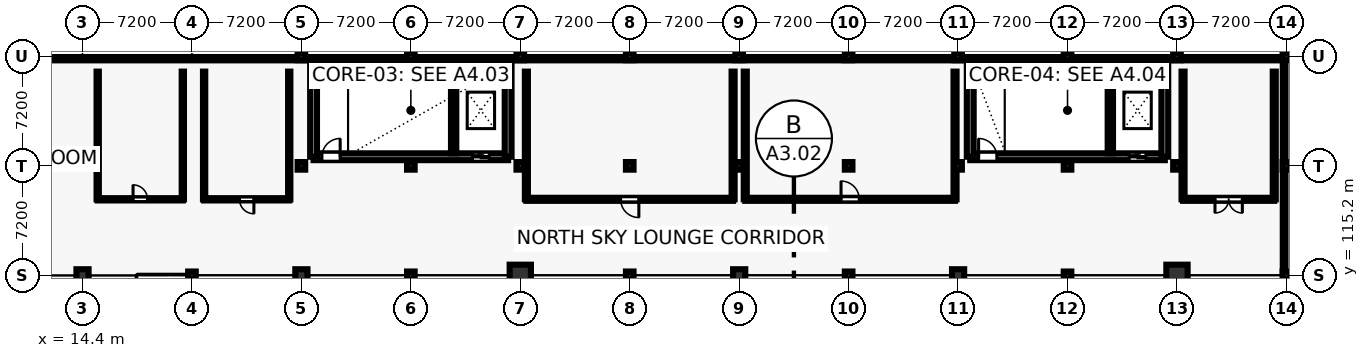
"""IFC4 building model, lengths in metres.
Left out: names, types, materials, properties, quantities, classifications, styles, units other than length and angle.
Written with IfcOpenShell. Run it as: python <this file> out.ifc"""

import sys

from ifc_helpers import new_model, si_unit, direction, frame, frame_2d, origin, origin_2d, place, context, subcontext, project, spatial, rectangle, circle, extrude, element, fill, save


model = new_model("IFC4")
c1 = context("Model", 3, precision=1e-05, world=origin(), true_north=direction((0.0, 1.0)))
c2 = subcontext(c1, "Body", "Model", "MODEL_VIEW")
j1 = project(units=[si_unit("LENGTHUNIT", "METRE"), si_unit("PLANEANGLEUNIT", "RADIAN")], contexts=[c1])
p1 = place(None, origin())
s1 = spatial("IfcSite", under=j1, at=p1, CompositionType="ELEMENT")
p2 = place(p1, origin())
s2 = spatial("IfcBuilding", under=s1, at=p2, CompositionType="ELEMENT")
p3 = place(p2, frame((0.0, 0.0, 23.0)))
s3 = spatial("IfcBuildingStorey", under=s2, at=p3, CompositionType="ELEMENT", Elevation=23.0)
p4 = place(p3, frame((14.4, 115.2, 0.0), z_axis=(0.0, 0.0, 1.0), x_axis=(1.0, 0.0, 0.0)))
e1 = element("IfcColumn", 1, at=p4, inside=s3, PredefinedType="COLUMN", context=c2, shape_type="SweptSolid", body=[
    extrude(circle(Radius=0.4, at=origin_2d()), origin(), (0.0, 0.0, 1.0), 5.92),
])
p5 = place(p3, frame((21.6, 115.2, 0.0), z_axis=(0.0, 0.0, 1.0), x_axis=(1.0, 0.0, 0.0)))
e2 = element("IfcColumn", 2, at=p5, inside=s3, PredefinedType="COLUMN", context=c2, shape_type="SweptSolid", body=[
    extrude(rectangle(XDim=0.5, YDim=0.5, at=origin_2d()), origin(), (0.0, 0.0, 1.0), 4.5),
])
p6 = place(p3, frame((28.8, 115.2, 0.0), z_axis=(0.0, 0.0, 1.0), x_axis=(1.0, 0.0, 0.0)))
e3 = element("IfcColumn", 3, at=p6, inside=s3, PredefinedType="COLUMN", context=c2, shape_type="SweptSolid", body=[
    extrude(circle(Radius=0.4, at=origin_2d()), origin(), (0.0, 0.0, 1.0), 4.75),
])
for number, where, z_axis, x_axis in (
    (4, (28.8, 122.4, 0.0), (0.0, 0.0, 1.0), (1.0, 0.0, 0.0)),
    (5, (28.8, 129.6, 0.0), (0.0, 0.0, 1.0), (1.0, 0.0, 0.0)),
    (6, (36.0, 115.2, 0.0), (0.0, 0.0, 1.0), (1.0, 0.0, 0.0)),
    (7, (36.0, 122.4, 0.0), (0.0, 0.0, 1.0), (1.0, 0.0, 0.0)),
    (8, (36.0, 129.6, 0.0), (0.0, 0.0, 1.0), (1.0, 0.0, 0.0)),
):
    element("IfcColumn", number, at=place(p3, frame(where, z_axis=z_axis, x_axis=x_axis)), inside=s3, PredefinedType="COLUMN", context=c2, shape_type="SweptSolid", body=[
        extrude(rectangle(XDim=0.5, YDim=0.5, at=origin_2d()), origin(), (0.0, 0.0, 1.0), 4.5),
    ])
p7 = place(p3, frame((43.2, 115.2, 0.0), z_axis=(0.0, 0.0, 1.0), x_axis=(1.0, 0.0, 0.0)))
e9 = element("IfcColumn", 9, at=p7, inside=s3, PredefinedType="COLUMN", context=c2, shape_type="SweptSolid", body=[
    extrude(circle(Radius=0.7, at=origin_2d()), origin(), (0.0, 0.0, 1.0), 4.75),
])
for number, where, z_axis, x_axis in (
    (10, (43.2, 122.4, 0.0), (0.0, 0.0, 1.0), (1.0, 0.0, 0.0)),
    (11, (43.2, 129.6, 0.0), (0.0, 0.0, 1.0), (1.0, 0.0, 0.0)),
    (12, (50.4, 115.2, 0.0), (0.0, 0.0, 1.0), (1.0, 0.0, 0.0)),
    (13, (50.4, 122.4, 0.0), (0.0, 0.0, 1.0), (1.0, 0.0, 0.0)),
    (14, (50.4, 129.6, 0.0), (0.0, 0.0, 1.0), (1.0, 0.0, 0.0)),
):
    element("IfcColumn", number, at=place(p3, frame(where, z_axis=z_axis, x_axis=x_axis)), inside=s3, PredefinedType="COLUMN", context=c2, shape_type="SweptSolid", body=[
        extrude(rectangle(XDim=0.5, YDim=0.5, at=origin_2d()), origin(), (0.0, 0.0, 1.0), 4.5),
    ])
p8 = place(p3, frame((57.6, 115.2, 0.0), z_axis=(0.0, 0.0, 1.0), x_axis=(1.0, 0.0, 0.0)))
e15 = element("IfcColumn", 15, at=p8, inside=s3, PredefinedType="COLUMN", context=c2, shape_type="SweptSolid", body=[
    extrude(circle(Radius=0.4, at=origin_2d()), origin(), (0.0, 0.0, 1.0), 4.75),
])
for number, where, z_axis, x_axis in (
    (16, (57.6, 122.4, 0.0), (0.0, 0.0, 1.0), (1.0, 0.0, 0.0)),
    (17, (57.6, 129.6, 0.0), (0.0, 0.0, 1.0), (1.0, 0.0, 0.0)),
    (18, (64.8, 115.2, 0.0), (0.0, 0.0, 1.0), (1.0, 0.0, 0.0)),
    (19, (64.8, 122.4, 0.0), (0.0, 0.0, 1.0), (1.0, 0.0, 0.0)),
    (20, (64.8, 129.6, 0.0), (0.0, 0.0, 1.0), (1.0, 0.0, 0.0)),
):
    element("IfcColumn", number, at=place(p3, frame(where, z_axis=z_axis, x_axis=x_axis)), inside=s3, PredefinedType="COLUMN", context=c2, shape_type="SweptSolid", body=[
        extrude(rectangle(XDim=0.5, YDim=0.5, at=origin_2d()), origin(), (0.0, 0.0, 1.0), 4.5),
    ])
p9 = place(p3, frame((72.0, 115.2, 0.0), z_axis=(0.0, 0.0, 1.0), x_axis=(1.0, 0.0, 0.0)))
e21 = element("IfcColumn", 21, at=p9, inside=s3, PredefinedType="COLUMN", context=c2, shape_type="SweptSolid", body=[
    extrude(circle(Radius=0.4, at=origin_2d()), origin(), (0.0, 0.0, 1.0), 4.75),
])
for number, where, z_axis, x_axis in (
    (22, (72.0, 122.4, 0.0), (0.0, 0.0, 1.0), (1.0, 0.0, 0.0)),
    (23, (72.0, 129.6, 0.0), (0.0, 0.0, 1.0), (1.0, 0.0, 0.0)),
    (24, (79.2, 115.2, 0.0), (0.0, 0.0, 1.0), (1.0, 0.0, 0.0)),
    (25, (79.2, 122.4, 0.0), (0.0, 0.0, 1.0), (1.0, 0.0, 0.0)),
    (26, (79.2, 129.6, 0.0), (0.0, 0.0, 1.0), (1.0, 0.0, 0.0)),
):
    element("IfcColumn", number, at=place(p3, frame(where, z_axis=z_axis, x_axis=x_axis)), inside=s3, PredefinedType="COLUMN", context=c2, shape_type="SweptSolid", body=[
        extrude(rectangle(XDim=0.5, YDim=0.5, at=origin_2d()), origin(), (0.0, 0.0, 1.0), 4.5),
    ])
p10 = place(p3, frame((86.4, 115.2, 0.0), z_axis=(0.0, 0.0, 1.0), x_axis=(1.0, 0.0, 0.0)))
e27 = element("IfcColumn", 27, at=p10, inside=s3, PredefinedType="COLUMN", context=c2, shape_type="SweptSolid", body=[
    extrude(circle(Radius=0.7, at=origin_2d()), origin(), (0.0, 0.0, 1.0), 4.75),
])
for number, where, z_axis, x_axis in (
    (28, (86.4, 122.4, 0.0), (0.0, 0.0, 1.0), (1.0, 0.0, 0.0)),
    (29, (86.4, 129.6, 0.0), (0.0, 0.0, 1.0), (1.0, 0.0, 0.0)),
    (30, (93.6, 115.2, 0.0), (0.0, 0.0, 1.0), (1.0, 0.0, 0.0)),
    (31, (93.6, 122.4, 0.0), (0.0, 0.0, 1.0), (1.0, 0.0, 0.0)),
    (32, (93.6, 129.6, 0.0), (0.0, 0.0, 1.0), (1.0, 0.0, 0.0)),
):
    element("IfcColumn", number, at=place(p3, frame(where, z_axis=z_axis, x_axis=x_axis)), inside=s3, PredefinedType="COLUMN", context=c2, shape_type="SweptSolid", body=[
        extrude(rectangle(XDim=0.5, YDim=0.5, at=origin_2d()), origin(), (0.0, 0.0, 1.0), 4.5),
    ])
p11 = place(p3, frame((29.6, 123.0, 0.0), z_axis=(0.0, 0.0, 1.0), x_axis=(1.0, 0.0, 0.0)))
e33 = element("IfcWall", 33, at=p11, inside=s3, PredefinedType="SHEAR", context=c2, shape_type="SweptSolid", body=[
    extrude(rectangle(XDim=12.8, YDim=0.45, at=frame_2d((6.4, 0.0))), origin(), (0.0, 0.0, 1.0), 4.28),
])
p12 = place(p11, frame((0.55, 0.0, 0.0)))
e34 = element("IfcOpeningElement", 34, at=p12, cuts=e33, PredefinedType="OPENING", context=c2, shape_type="SweptSolid", body=[
    extrude(rectangle(XDim=1.2, YDim=2.25, at=frame_2d((0.6, 1.125))), frame((0.0, 0.235, 0.0), z_axis=(0.0, -1.0, 0.0), x_axis=(1.0, 0.0, 0.0)), (0.0, 0.0, 1.0), 0.47),
])
p13 = place(p11, frame((10.458, 0.0, 0.0)))
e35 = element("IfcOpeningElement", 35, at=p13, cuts=e33, PredefinedType="OPENING", context=c2, shape_type="SweptSolid", body=[
    extrude(rectangle(XDim=1.1, YDim=2.2, at=frame_2d((0.55, 1.1))), frame((0.0, 0.235, 0.0), z_axis=(0.0, -1.0, 0.0), x_axis=(1.0, 0.0, 0.0)), (0.0, 0.0, 1.0), 0.47),
])
p14 = place(p3, frame((29.6, 129.1, 0.0), z_axis=(0.0, 0.0, 1.0), x_axis=(1.0, 0.0, 0.0)))
e36 = element("IfcWall", 36, at=p14, inside=s3, PredefinedType="SHEAR", context=c2, shape_type="SweptSolid", body=[
    extrude(rectangle(XDim=12.8, YDim=0.45, at=frame_2d((6.4, 0.0))), origin(), (0.0, 0.0, 1.0), 4.28),
])
for number, where, z_axis, x_axis in (
    (37, (29.6, 123.0, 0.0), (0.0, 0.0, 1.0), (0.0, 1.0, 0.0)),
    (38, (42.4, 123.0, 0.0), (0.0, 0.0, 1.0), (0.0, 1.0, 0.0)),
):
    element("IfcWall", number, at=place(p3, frame(where, z_axis=z_axis, x_axis=x_axis)), inside=s3, PredefinedType="SHEAR", context=c2, shape_type="SweptSolid", body=[
        extrude(rectangle(XDim=6.1, YDim=0.45, at=frame_2d((3.05, 0.0))), origin(), (0.0, 0.0, 1.0), 4.28),
    ])
p15 = place(p3, frame((38.816, 123.225, 0.0), z_axis=(0.0, 0.0, 1.0), x_axis=(0.0, 1.0, 0.0)))
e39 = element("IfcWall", 39, at=p15, inside=s3, PredefinedType="SHEAR", context=c2, shape_type="SweptSolid", body=[
    extrude(rectangle(XDim=5.65, YDim=0.35, at=frame_2d((2.825, 0.0))), origin(), (0.0, 0.0, 1.0), 4.28),
])
p16 = place(p3, frame((72.8, 123.0, 0.0), z_axis=(0.0, 0.0, 1.0), x_axis=(1.0, 0.0, 0.0)))
e40 = element("IfcWall", 40, at=p16, inside=s3, PredefinedType="SHEAR", context=c2, shape_type="SweptSolid", body=[
    extrude(rectangle(XDim=12.8, YDim=0.45, at=frame_2d((6.4, 0.0))), origin(), (0.0, 0.0, 1.0), 4.28),
])
p17 = place(p16, frame((0.55, 0.0, 0.0)))
e41 = element("IfcOpeningElement", 41, at=p17, cuts=e40, PredefinedType="OPENING", context=c2, shape_type="SweptSolid", body=[
    extrude(rectangle(XDim=1.2, YDim=2.25, at=frame_2d((0.6, 1.125))), frame((0.0, 0.235, 0.0), z_axis=(0.0, -1.0, 0.0), x_axis=(1.0, 0.0, 0.0)), (0.0, 0.0, 1.0), 0.47),
])
p18 = place(p16, frame((10.458, 0.0, 0.0)))
e42 = element("IfcOpeningElement", 42, at=p18, cuts=e40, PredefinedType="OPENING", context=c2, shape_type="SweptSolid", body=[
    extrude(rectangle(XDim=1.1, YDim=2.2, at=frame_2d((0.55, 1.1))), frame((0.0, 0.235, 0.0), z_axis=(0.0, -1.0, 0.0), x_axis=(1.0, 0.0, 0.0)), (0.0, 0.0, 1.0), 0.47),
])
p19 = place(p3, frame((72.8, 129.1, 0.0), z_axis=(0.0, 0.0, 1.0), x_axis=(1.0, 0.0, 0.0)))
e43 = element("IfcWall", 43, at=p19, inside=s3, PredefinedType="SHEAR", context=c2, shape_type="SweptSolid", body=[
    extrude(rectangle(XDim=12.8, YDim=0.45, at=frame_2d((6.4, 0.0))), origin(), (0.0, 0.0, 1.0), 4.28),
])
for number, where, z_axis, x_axis in (
    (44, (72.8, 123.0, 0.0), (0.0, 0.0, 1.0), (0.0, 1.0, 0.0)),
    (45, (85.6, 123.0, 0.0), (0.0, 0.0, 1.0), (0.0, 1.0, 0.0)),
):
    element("IfcWall", number, at=place(p3, frame(where, z_axis=z_axis, x_axis=x_axis)), inside=s3, PredefinedType="SHEAR", context=c2, shape_type="SweptSolid", body=[
        extrude(rectangle(XDim=6.1, YDim=0.45, at=frame_2d((3.05, 0.0))), origin(), (0.0, 0.0, 1.0), 4.28),
    ])
p20 = place(p3, frame((82.016, 123.225, 0.0), z_axis=(0.0, 0.0, 1.0), x_axis=(0.0, 1.0, 0.0)))
e46 = element("IfcWall", 46, at=p20, inside=s3, PredefinedType="SHEAR", context=c2, shape_type="SweptSolid", body=[
    extrude(rectangle(XDim=5.65, YDim=0.35, at=frame_2d((2.825, 0.0))), origin(), (0.0, 0.0, 1.0), 4.28),
])
p21 = place(p3, frame((0.15, 129.45, 4.5), z_axis=(0.0, 0.0, 1.0), x_axis=(1.0, 0.0, 0.0)))
e47 = element("IfcWall", 47, at=p21, inside=s3, PredefinedType="PARAPET", context=c2, shape_type="SweptSolid", body=[
    extrude(rectangle(XDim=93.3, YDim=0.22, at=frame_2d((46.65, 0.0))), origin(), (0.0, 0.0, 1.0), 1.15),
])
p22 = place(p3, frame((93.45, 115.35, 4.5), z_axis=(0.0, 0.0, 1.0), x_axis=(0.0, 1.0, 0.0)))
e48 = element("IfcWall", 48, at=p22, inside=s3, PredefinedType="PARAPET", context=c2, shape_type="SweptSolid", body=[
    extrude(rectangle(XDim=14.1, YDim=0.18, at=frame_2d((7.05, 0.0))), origin(), (0.0, 0.0, 1.0), 1.15),
])
p23 = place(p3, frame((43.6, 120.2, 0.0), z_axis=(0.0, 0.0, 1.0), x_axis=(1.0, 0.0, 0.0)))
e49 = element("IfcWall", 49, at=p23, inside=s3, PredefinedType="PARTITIONING", context=c2, shape_type="SweptSolid", body=[
    extrude(rectangle(XDim=13.6, YDim=0.2, at=frame_2d((6.8, 0.0))), origin(), (0.0, 0.0, 1.0), 3.34),
])
p24 = place(p23, frame((6.2, 0.0, 0.0)))
e50 = element("IfcOpeningElement", 50, at=p24, cuts=e49, PredefinedType="OPENING", context=c2, shape_type="SweptSolid", body=[
    extrude(rectangle(XDim=1.2, YDim=2.25, at=frame_2d((0.6, 1.125))), frame((0.0, 0.11, 0.0), z_axis=(0.0, -1.0, 0.0), x_axis=(1.0, 0.0, 0.0)), (0.0, 0.0, 1.0), 0.22),
])
for number, where, z_axis, x_axis in (
    (51, (57.2, 120.2, 0.0), (0.0, 0.0, 1.0), (0.0, 1.0, 0.0)),
    (52, (43.6, 128.6, 0.0), (0.0, 0.0, 1.0), (0.0, -1.0, 0.0)),
):
    element("IfcWall", number, at=place(p3, frame(where, z_axis=z_axis, x_axis=x_axis)), inside=s3, PredefinedType="PARTITIONING", context=c2, shape_type="SweptSolid", body=[
        extrude(rectangle(XDim=8.4, YDim=0.2, at=frame_2d((4.2, 0.0))), origin(), (0.0, 0.0, 1.0), 3.34),
    ])
p25 = place(p3, frame((58.0, 120.2, 0.0), z_axis=(0.0, 0.0, 1.0), x_axis=(1.0, 0.0, 0.0)))
e53 = element("IfcWall", 53, at=p25, inside=s3, PredefinedType="PARTITIONING", context=c2, shape_type="SweptSolid", body=[
    extrude(rectangle(XDim=13.8, YDim=0.2, at=frame_2d((6.9, 0.0))), origin(), (0.0, 0.0, 1.0), 3.34),
])
p26 = place(p25, frame((6.3, 0.0, 0.0)))
e54 = element("IfcOpeningElement", 54, at=p26, cuts=e53, PredefinedType="OPENING", context=c2, shape_type="SweptSolid", body=[
    extrude(rectangle(XDim=1.2, YDim=2.25, at=frame_2d((0.6, 1.125))), frame((0.0, 0.11, 0.0), z_axis=(0.0, -1.0, 0.0), x_axis=(1.0, 0.0, 0.0)), (0.0, 0.0, 1.0), 0.22),
])
for number, where, z_axis, x_axis in (
    (55, (71.8, 120.2, 0.0), (0.0, 0.0, 1.0), (0.0, 1.0, 0.0)),
    (56, (58.0, 128.6, 0.0), (0.0, 0.0, 1.0), (0.0, -1.0, 0.0)),
):
    element("IfcWall", number, at=place(p3, frame(where, z_axis=z_axis, x_axis=x_axis)), inside=s3, PredefinedType="PARTITIONING", context=c2, shape_type="SweptSolid", body=[
        extrude(rectangle(XDim=8.4, YDim=0.2, at=frame_2d((4.2, 0.0))), origin(), (0.0, 0.0, 1.0), 3.34),
    ])
p27 = place(p3, frame((86.8, 120.2, 0.0), z_axis=(0.0, 0.0, 1.0), x_axis=(1.0, 0.0, 0.0)))
e57 = element("IfcWall", 57, at=p27, inside=s3, PredefinedType="PARTITIONING", context=c2, shape_type="SweptSolid", body=[
    extrude(rectangle(XDim=6.0, YDim=0.2, at=frame_2d((3.0, 0.0))), origin(), (0.0, 0.0, 1.0), 3.34),
])
p28 = place(p27, frame((2.1, 0.0, 0.0)))
e58 = element("IfcOpeningElement", 58, at=p28, cuts=e57, PredefinedType="OPENING", context=c2, shape_type="SweptSolid", body=[
    extrude(rectangle(XDim=1.8, YDim=2.3, at=frame_2d((0.9, 1.15))), frame((0.0, 0.11, 0.0), z_axis=(0.0, -1.0, 0.0), x_axis=(1.0, 0.0, 0.0)), (0.0, 0.0, 1.0), 0.22),
])
for number, where, z_axis, x_axis in (
    (59, (92.8, 120.2, 0.0), (0.0, 0.0, 1.0), (0.0, 1.0, 0.0)),
    (60, (86.8, 128.6, 0.0), (0.0, 0.0, 1.0), (0.0, -1.0, 0.0)),
):
    element("IfcWall", number, at=place(p3, frame(where, z_axis=z_axis, x_axis=x_axis)), inside=s3, PredefinedType="PARTITIONING", context=c2, shape_type="SweptSolid", body=[
        extrude(rectangle(XDim=8.4, YDim=0.2, at=frame_2d((4.2, 0.0))), origin(), (0.0, 0.0, 1.0), 3.34),
    ])
p29 = place(p3, frame((15.4, 120.2, 0.0), z_axis=(0.0, 0.0, 1.0), x_axis=(1.0, 0.0, 0.0)))
e61 = element("IfcWall", 61, at=p29, inside=s3, PredefinedType="PARTITIONING", context=c2, shape_type="SweptSolid", body=[
    extrude(rectangle(XDim=5.6, YDim=0.15, at=frame_2d((2.8, 0.0))), origin(), (0.0, 0.0, 1.0), 3.34),
])
p30 = place(p29, frame((2.325, 0.0, 0.0)))
e62 = element("IfcOpeningElement", 62, at=p30, cuts=e61, PredefinedType="OPENING", context=c2, shape_type="SweptSolid", body=[
    extrude(rectangle(XDim=0.95, YDim=2.15, at=frame_2d((0.475, 1.075))), frame((0.0, 0.085, 0.0), z_axis=(0.0, -1.0, 0.0), x_axis=(1.0, 0.0, 0.0)), (0.0, 0.0, 1.0), 0.17),
])
for number, where, z_axis, x_axis in (
    (63, (21.0, 120.2, 0.0), (0.0, 0.0, 1.0), (0.0, 1.0, 0.0)),
    (64, (15.4, 128.6, 0.0), (0.0, 0.0, 1.0), (0.0, -1.0, 0.0)),
):
    element("IfcWall", number, at=place(p3, frame(where, z_axis=z_axis, x_axis=x_axis)), inside=s3, PredefinedType="PARTITIONING", context=c2, shape_type="SweptSolid", body=[
        extrude(rectangle(XDim=8.4, YDim=0.15, at=frame_2d((4.2, 0.0))), origin(), (0.0, 0.0, 1.0), 3.34),
    ])
p31 = place(p3, frame((22.4, 120.2, 0.0), z_axis=(0.0, 0.0, 1.0), x_axis=(1.0, 0.0, 0.0)))
e65 = element("IfcWall", 65, at=p31, inside=s3, PredefinedType="PARTITIONING", context=c2, shape_type="SweptSolid", body=[
    extrude(rectangle(XDim=5.6, YDim=0.15, at=frame_2d((2.8, 0.0))), origin(), (0.0, 0.0, 1.0), 3.34),
])
p32 = place(p31, frame((2.325, 0.0, 0.0)))
e66 = element("IfcOpeningElement", 66, at=p32, cuts=e65, PredefinedType="OPENING", context=c2, shape_type="SweptSolid", body=[
    extrude(rectangle(XDim=0.95, YDim=2.15, at=frame_2d((0.475, 1.075))), frame((0.0, 0.085, 0.0), z_axis=(0.0, -1.0, 0.0), x_axis=(1.0, 0.0, 0.0)), (0.0, 0.0, 1.0), 0.17),
])
for number, where, z_axis, x_axis in (
    (67, (28.0, 120.2, 0.0), (0.0, 0.0, 1.0), (0.0, 1.0, 0.0)),
    (68, (22.4, 128.6, 0.0), (0.0, 0.0, 1.0), (0.0, -1.0, 0.0)),
):
    element("IfcWall", number, at=place(p3, frame(where, z_axis=z_axis, x_axis=x_axis)), inside=s3, PredefinedType="PARTITIONING", context=c2, shape_type="SweptSolid", body=[
        extrude(rectangle(XDim=8.4, YDim=0.15, at=frame_2d((4.2, 0.0))), origin(), (0.0, 0.0, 1.0), 3.34),
    ])
p33 = place(p12, origin())
e69 = element("IfcDoor", 69, at=p33, inside=s3, OperationType="SINGLE_SWING_RIGHT", PredefinedType="DOOR", context=c2, shape_type="SweptSolid", body=[
    extrude(rectangle(XDim=1.2, YDim=2.25, at=frame_2d((0.6, 1.125))), frame((0.0, 0.025, 0.0), z_axis=(0.0, -1.0, 0.0), x_axis=(1.0, 0.0, 0.0)), (0.0, 0.0, 1.0), 0.05),
])
fill(e34, e69)
p34 = place(p13, origin())
e70 = element("IfcDoor", 70, at=p34, inside=s3, OperationType="SLIDING_TO_LEFT", PredefinedType="DOOR", context=c2, shape_type="SweptSolid", body=[
    extrude(rectangle(XDim=1.1, YDim=2.2, at=frame_2d((0.55, 1.1))), frame((0.0, 0.025, 0.0), z_axis=(0.0, -1.0, 0.0), x_axis=(1.0, 0.0, 0.0)), (0.0, 0.0, 1.0), 0.05),
])
fill(e35, e70)
p35 = place(p17, origin())
e71 = element("IfcDoor", 71, at=p35, inside=s3, OperationType="SINGLE_SWING_LEFT", PredefinedType="DOOR", context=c2, shape_type="SweptSolid", body=[
    extrude(rectangle(XDim=1.2, YDim=2.25, at=frame_2d((0.6, 1.125))), frame((0.0, 0.025, 0.0), z_axis=(0.0, -1.0, 0.0), x_axis=(1.0, 0.0, 0.0)), (0.0, 0.0, 1.0), 0.05),
])
fill(e41, e71)
p36 = place(p18, origin())
e72 = element("IfcDoor", 72, at=p36, inside=s3, OperationType="SLIDING_TO_LEFT", PredefinedType="DOOR", context=c2, shape_type="SweptSolid", body=[
    extrude(rectangle(XDim=1.1, YDim=2.2, at=frame_2d((0.55, 1.1))), frame((0.0, 0.025, 0.0), z_axis=(0.0, -1.0, 0.0), x_axis=(1.0, 0.0, 0.0)), (0.0, 0.0, 1.0), 0.05),
])
fill(e42, e72)
p37 = place(p24, frame((1.2, 0.0, 0.0), z_axis=(0.0, 0.0, 1.0), x_axis=(-1.0, 0.0, 0.0)))
e73 = element("IfcDoor", 73, at=p37, inside=s3, OperationType="SINGLE_SWING_RIGHT", PredefinedType="DOOR", context=c2, shape_type="SweptSolid", body=[
    extrude(rectangle(XDim=1.2, YDim=2.25, at=frame_2d((0.6, 1.125))), frame((0.0, 0.025, 0.0), z_axis=(0.0, -1.0, 0.0), x_axis=(1.0, 0.0, 0.0)), (0.0, 0.0, 1.0), 0.05),
])
fill(e50, e73)
p38 = place(p26, origin())
e74 = element("IfcDoor", 74, at=p38, inside=s3, OperationType="SINGLE_SWING_LEFT", PredefinedType="DOOR", context=c2, shape_type="SweptSolid", body=[
    extrude(rectangle(XDim=1.2, YDim=2.25, at=frame_2d((0.6, 1.125))), frame((0.0, 0.025, 0.0), z_axis=(0.0, -1.0, 0.0), x_axis=(1.0, 0.0, 0.0)), (0.0, 0.0, 1.0), 0.05),
])
fill(e54, e74)
p39 = place(p28, frame((1.8, 0.0, 0.0), z_axis=(0.0, 0.0, 1.0), x_axis=(-1.0, 0.0, 0.0)))
e75 = element("IfcDoor", 75, at=p39, inside=s3, OperationType="DOUBLE_DOOR_SINGLE_SWING", PredefinedType="DOOR", context=c2, shape_type="SweptSolid", body=[
    extrude(rectangle(XDim=1.8, YDim=2.3, at=frame_2d((0.9, 1.15))), frame((0.0, 0.025, 0.0), z_axis=(0.0, -1.0, 0.0), x_axis=(1.0, 0.0, 0.0)), (0.0, 0.0, 1.0), 0.05),
])
fill(e58, e75)
p40 = place(p30, origin())
e76 = element("IfcDoor", 76, at=p40, inside=s3, OperationType="SINGLE_SWING_LEFT", PredefinedType="DOOR", context=c2, shape_type="SweptSolid", body=[
    extrude(rectangle(XDim=0.95, YDim=2.15, at=frame_2d((0.475, 1.075))), frame((0.0, 0.025, 0.0), z_axis=(0.0, -1.0, 0.0), x_axis=(1.0, 0.0, 0.0)), (0.0, 0.0, 1.0), 0.05),
])
fill(e62, e76)
p41 = place(p32, frame((0.95, 0.0, 0.0), z_axis=(0.0, 0.0, 1.0), x_axis=(-1.0, 0.0, 0.0)))
e77 = element("IfcDoor", 77, at=p41, inside=s3, OperationType="SINGLE_SWING_RIGHT", PredefinedType="DOOR", context=c2, shape_type="SweptSolid", body=[
    extrude(rectangle(XDim=0.95, YDim=2.15, at=frame_2d((0.475, 1.075))), frame((0.0, 0.025, 0.0), z_axis=(0.0, -1.0, 0.0), x_axis=(1.0, 0.0, 0.0)), (0.0, 0.0, 1.0), 0.05),
])
fill(e66, e77)
save(model, sys.argv[1])
